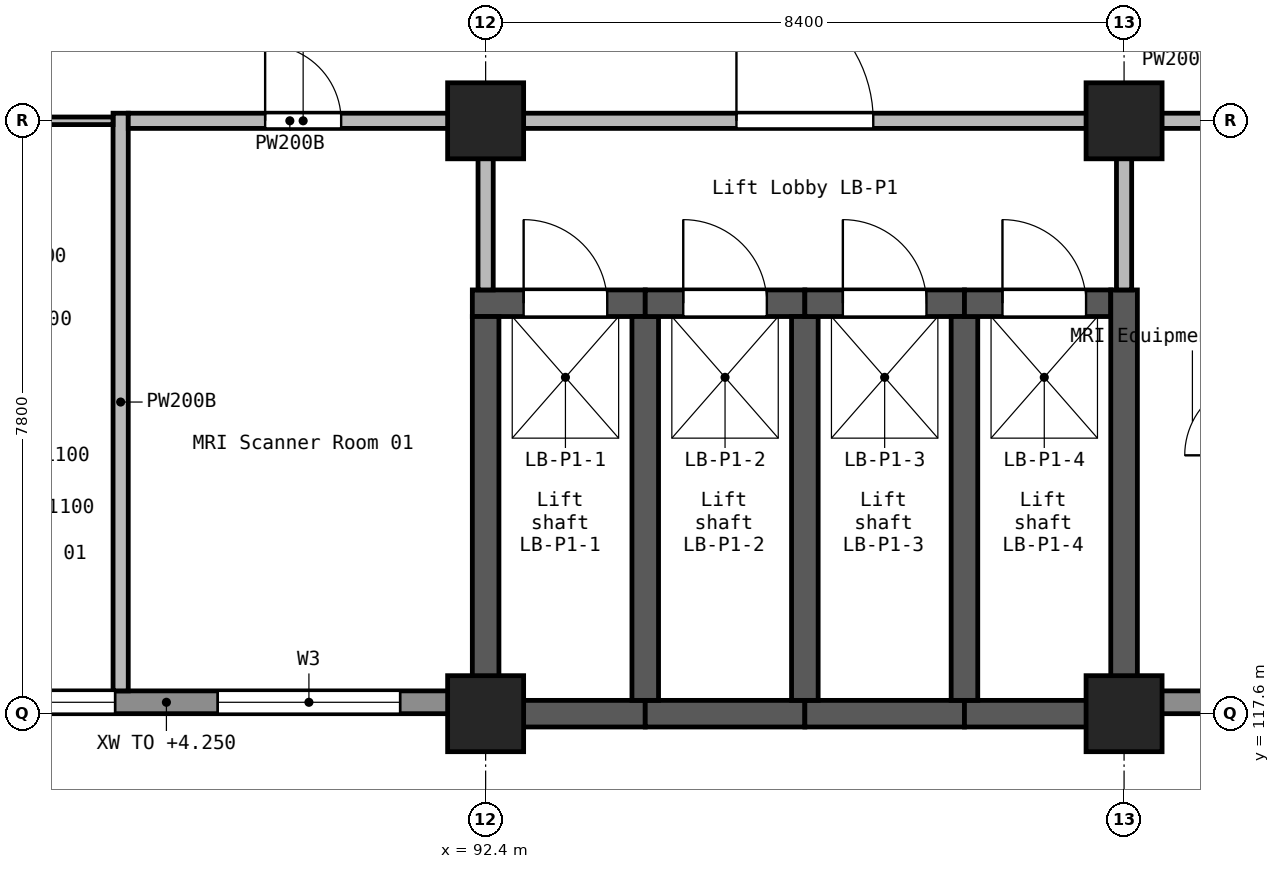
"""IFC4 building model, lengths in metres.
Left out: names, types, materials, properties, quantities, classifications, styles, units other than length and angle.
Written with IfcOpenShell. Run it as: python <this file> out.ifc"""

import sys

from ifc_helpers import new_model, si_unit, direction, frame, frame_2d, origin, origin_2d, place, context, subcontext, project, spatial, rectangle, extrude, element, fill, save


model = new_model("IFC4")
c1 = context("Model", 3, precision=1e-05, world=origin(), true_north=direction((0.0, 1.0)))
c2 = subcontext(c1, "Body", "Model", "MODEL_VIEW")
j1 = project(units=[si_unit("LENGTHUNIT", "METRE"), si_unit("PLANEANGLEUNIT", "RADIAN")], contexts=[c1])
p1 = place(None, origin())
s1 = spatial("IfcSite", under=j1, at=p1, CompositionType="ELEMENT")
p2 = place(p1, origin())
s2 = spatial("IfcBuilding", under=s1, at=p2, CompositionType="ELEMENT")
p3 = place(p2, origin())
s3 = spatial("IfcBuildingStorey", under=s2, at=p3, CompositionType="ELEMENT", Elevation=0.0)
for number, where, z_axis, x_axis in (
    (1, (92.4, 117.6, -0.3), (0.0, 0.0, 1.0), (1.0, 0.0, 0.0)),
    (2, (92.4, 125.4, -0.3), (0.0, 0.0, 1.0), (1.0, 0.0, 0.0)),
    (3, (100.8, 117.6, -0.3), (0.0, 0.0, 1.0), (1.0, 0.0, 0.0)),
    (4, (100.8, 125.4, -0.3), (0.0, 0.0, 1.0), (1.0, 0.0, 0.0)),
):
    element("IfcColumn", number, at=place(p3, frame(where, z_axis=z_axis, x_axis=x_axis)), inside=s3, PredefinedType="COLUMN", context=c2, shape_type="SweptSolid", body=[
        extrude(rectangle(XDim=1.0, YDim=1.0, at=origin_2d()), origin(), (0.0, 0.0, 1.0), 5.7),
    ])
p4 = place(p3, frame((92.225, 123.0, -0.3), z_axis=(0.0, 0.0, 1.0), x_axis=(1.0, 0.0, 0.0)))
e5 = element("IfcWall", 5, at=p4, inside=s3, PredefinedType="SHEAR", context=c2, shape_type="SweptSolid", body=[
    extrude(rectangle(XDim=2.275, YDim=0.35, at=frame_2d((1.137, 0.0))), origin(), (0.0, 0.0, 1.0), 5.7),
])
p5 = place(p4, frame((0.675, 0.0, 0.3)))
e6 = element("IfcOpeningElement", 6, at=p5, cuts=e5, PredefinedType="OPENING", context=c2, shape_type="SweptSolid", body=[
    extrude(rectangle(XDim=1.1, YDim=2.1, at=frame_2d((0.55, 1.05))), frame((0.0, 0.185, 0.0), z_axis=(0.0, -1.0, 0.0), x_axis=(1.0, 0.0, 0.0)), (0.0, 0.0, 1.0), 0.37),
])
p6 = place(p3, frame((92.4, 117.425, -0.3), z_axis=(0.0, 0.0, 1.0), x_axis=(0.0, 1.0, 0.0)))
e7 = element("IfcWall", 7, at=p6, inside=s3, PredefinedType="SHEAR", context=c2, shape_type="SweptSolid", body=[
    extrude(rectangle(XDim=5.4, YDim=0.35, at=frame_2d((2.7, 0.0))), origin(), (0.0, 0.0, 1.0), 5.7),
])
p7 = place(p3, frame((92.575, 117.6, -0.3), z_axis=(0.0, 0.0, 1.0), x_axis=(1.0, 0.0, 0.0)))
e8 = element("IfcWall", 8, at=p7, inside=s3, PredefinedType="SHEAR", context=c2, shape_type="SweptSolid", body=[
    extrude(rectangle(XDim=1.925, YDim=0.35, at=frame_2d((0.962, 0.0))), origin(), (0.0, 0.0, 1.0), 5.7),
])
p8 = place(p3, frame((94.5, 117.6, -0.3), z_axis=(0.0, 0.0, 1.0), x_axis=(1.0, 0.0, 0.0)))
e9 = element("IfcWall", 9, at=p8, inside=s3, PredefinedType="SHEAR", context=c2, shape_type="SweptSolid", body=[
    extrude(rectangle(XDim=2.1, YDim=0.35, at=frame_2d((1.05, 0.0))), origin(), (0.0, 0.0, 1.0), 5.7),
])
p9 = place(p3, frame((94.5, 117.775, -0.3), z_axis=(0.0, 0.0, 1.0), x_axis=(0.0, 1.0, 0.0)))
e10 = element("IfcWall", 10, at=p9, inside=s3, PredefinedType="SHEAR", context=c2, shape_type="SweptSolid", body=[
    extrude(rectangle(XDim=5.05, YDim=0.35, at=frame_2d((2.525, 0.0))), origin(), (0.0, 0.0, 1.0), 5.7),
])
p10 = place(p3, frame((94.5, 123.0, -0.3), z_axis=(0.0, 0.0, 1.0), x_axis=(1.0, 0.0, 0.0)))
e11 = element("IfcWall", 11, at=p10, inside=s3, PredefinedType="SHEAR", context=c2, shape_type="SweptSolid", body=[
    extrude(rectangle(XDim=2.1, YDim=0.35, at=frame_2d((1.05, 0.0))), origin(), (0.0, 0.0, 1.0), 5.7),
])
p11 = place(p10, frame((0.5, 0.0, 0.3)))
e12 = element("IfcOpeningElement", 12, at=p11, cuts=e11, PredefinedType="OPENING", context=c2, shape_type="SweptSolid", body=[
    extrude(rectangle(XDim=1.1, YDim=2.1, at=frame_2d((0.55, 1.05))), frame((0.0, 0.185, 0.0), z_axis=(0.0, -1.0, 0.0), x_axis=(1.0, 0.0, 0.0)), (0.0, 0.0, 1.0), 0.37),
])
p12 = place(p3, frame((96.6, 117.6, -0.3), z_axis=(0.0, 0.0, 1.0), x_axis=(1.0, 0.0, 0.0)))
e13 = element("IfcWall", 13, at=p12, inside=s3, PredefinedType="SHEAR", context=c2, shape_type="SweptSolid", body=[
    extrude(rectangle(XDim=2.1, YDim=0.35, at=frame_2d((1.05, 0.0))), origin(), (0.0, 0.0, 1.0), 5.7),
])
p13 = place(p3, frame((96.6, 117.775, -0.3), z_axis=(0.0, 0.0, 1.0), x_axis=(0.0, 1.0, 0.0)))
e14 = element("IfcWall", 14, at=p13, inside=s3, PredefinedType="SHEAR", context=c2, shape_type="SweptSolid", body=[
    extrude(rectangle(XDim=5.05, YDim=0.35, at=frame_2d((2.525, 0.0))), origin(), (0.0, 0.0, 1.0), 5.7),
])
p14 = place(p3, frame((96.6, 123.0, -0.3), z_axis=(0.0, 0.0, 1.0), x_axis=(1.0, 0.0, 0.0)))
e15 = element("IfcWall", 15, at=p14, inside=s3, PredefinedType="SHEAR", context=c2, shape_type="SweptSolid", body=[
    extrude(rectangle(XDim=2.1, YDim=0.35, at=frame_2d((1.05, 0.0))), origin(), (0.0, 0.0, 1.0), 5.7),
])
p15 = place(p14, frame((0.5, 0.0, 0.3)))
e16 = element("IfcOpeningElement", 16, at=p15, cuts=e15, PredefinedType="OPENING", context=c2, shape_type="SweptSolid", body=[
    extrude(rectangle(XDim=1.1, YDim=2.1, at=frame_2d((0.55, 1.05))), frame((0.0, 0.185, 0.0), z_axis=(0.0, -1.0, 0.0), x_axis=(1.0, 0.0, 0.0)), (0.0, 0.0, 1.0), 0.37),
])
p16 = place(p3, frame((98.7, 117.6, -0.3), z_axis=(0.0, 0.0, 1.0), x_axis=(1.0, 0.0, 0.0)))
e17 = element("IfcWall", 17, at=p16, inside=s3, PredefinedType="SHEAR", context=c2, shape_type="SweptSolid", body=[
    extrude(rectangle(XDim=1.925, YDim=0.35, at=frame_2d((0.962, 0.0))), origin(), (0.0, 0.0, 1.0), 5.7),
])
p17 = place(p3, frame((98.7, 117.775, -0.3), z_axis=(0.0, 0.0, 1.0), x_axis=(0.0, 1.0, 0.0)))
e18 = element("IfcWall", 18, at=p17, inside=s3, PredefinedType="SHEAR", context=c2, shape_type="SweptSolid", body=[
    extrude(rectangle(XDim=5.05, YDim=0.35, at=frame_2d((2.525, 0.0))), origin(), (0.0, 0.0, 1.0), 5.7),
])
p18 = place(p3, frame((98.7, 123.0, -0.3), z_axis=(0.0, 0.0, 1.0), x_axis=(1.0, 0.0, 0.0)))
e19 = element("IfcWall", 19, at=p18, inside=s3, PredefinedType="SHEAR", context=c2, shape_type="SweptSolid", body=[
    extrude(rectangle(XDim=1.925, YDim=0.35, at=frame_2d((0.962, 0.0))), origin(), (0.0, 0.0, 1.0), 5.7),
])
p19 = place(p18, frame((0.5, 0.0, 0.3)))
e20 = element("IfcOpeningElement", 20, at=p19, cuts=e19, PredefinedType="OPENING", context=c2, shape_type="SweptSolid", body=[
    extrude(rectangle(XDim=1.1, YDim=2.1, at=frame_2d((0.55, 1.05))), frame((0.0, 0.185, 0.0), z_axis=(0.0, -1.0, 0.0), x_axis=(1.0, 0.0, 0.0)), (0.0, 0.0, 1.0), 0.37),
])
p20 = place(p3, frame((100.8, 117.425, -0.3), z_axis=(0.0, 0.0, 1.0), x_axis=(0.0, 1.0, 0.0)))
e21 = element("IfcWall", 21, at=p20, inside=s3, PredefinedType="SHEAR", context=c2, shape_type="SweptSolid", body=[
    extrude(rectangle(XDim=5.75, YDim=0.35, at=frame_2d((2.875, 0.0))), origin(), (0.0, 0.0, 1.0), 5.7),
])
p21 = place(p3, frame((84.45, 117.75, 0.0), z_axis=(0.0, 0.0, 1.0), x_axis=(1.0, 0.0, 0.0)))
e22 = element("IfcWall", 22, at=p21, inside=s3, PredefinedType="STANDARD", context=c2, shape_type="SweptSolid", body=[
    extrude(rectangle(XDim=7.5, YDim=0.3, at=frame_2d((3.75, 0.0))), origin(), (0.0, 0.0, 1.0), 4.25),
])
p22 = place(p21, frame((0.675, 0.0, 0.9)))
e23 = element("IfcOpeningElement", 23, at=p22, cuts=e22, PredefinedType="OPENING", context=c2, shape_type="SweptSolid", body=[
    extrude(rectangle(XDim=2.4, YDim=1.5, at=frame_2d((1.2, 0.75))), frame((0.0, 0.16, 0.0), z_axis=(0.0, -1.0, 0.0), x_axis=(1.0, 0.0, 0.0)), (0.0, 0.0, 1.0), 0.32),
])
p23 = place(p21, frame((4.425, 0.0, 0.9)))
e24 = element("IfcOpeningElement", 24, at=p23, cuts=e22, PredefinedType="OPENING", context=c2, shape_type="SweptSolid", body=[
    extrude(rectangle(XDim=2.4, YDim=1.5, at=frame_2d((1.2, 0.75))), frame((0.0, 0.16, 0.0), z_axis=(0.0, -1.0, 0.0), x_axis=(1.0, 0.0, 0.0)), (0.0, 0.0, 1.0), 0.32),
])
p24 = place(p3, frame((101.25, 117.75, 0.0), z_axis=(0.0, 0.0, 1.0), x_axis=(1.0, 0.0, 0.0)))
e25 = element("IfcWall", 25, at=p24, inside=s3, PredefinedType="STANDARD", context=c2, shape_type="SweptSolid", body=[
    extrude(rectangle(XDim=7.5, YDim=0.3, at=frame_2d((3.75, 0.0))), origin(), (0.0, 0.0, 1.0), 4.25),
])
p25 = place(p24, frame((1.525, 0.0, 0.9)))
e26 = element("IfcOpeningElement", 26, at=p25, cuts=e25, PredefinedType="OPENING", context=c2, shape_type="SweptSolid", body=[
    extrude(rectangle(XDim=2.4, YDim=1.5, at=frame_2d((1.2, 0.75))), frame((0.0, 0.16, 0.0), z_axis=(0.0, -1.0, 0.0), x_axis=(1.0, 0.0, 0.0)), (0.0, 0.0, 1.0), 0.32),
])
p26 = place(p24, frame((4.425, 0.0, 0.9)))
e27 = element("IfcOpeningElement", 27, at=p26, cuts=e25, PredefinedType="OPENING", context=c2, shape_type="SweptSolid", body=[
    extrude(rectangle(XDim=2.4, YDim=1.5, at=frame_2d((1.2, 0.75))), frame((0.0, 0.16, 0.0), z_axis=(0.0, -1.0, 0.0), x_axis=(1.0, 0.0, 0.0)), (0.0, 0.0, 1.0), 0.32),
])
p27 = place(p3, frame((92.85, 125.4, 0.0), z_axis=(0.0, 0.0, 1.0), x_axis=(1.0, 0.0, 0.0)))
e28 = element("IfcWall", 28, at=p27, inside=s3, PredefinedType="SOLIDWALL", context=c2, shape_type="SweptSolid", body=[
    extrude(rectangle(XDim=7.5, YDim=0.2, at=frame_2d((3.75, 0.0))), origin(), (0.0, 0.0, 1.0), 5.05),
])
p28 = place(p27, frame((2.85, 0.0, 0.0)))
e29 = element("IfcOpeningElement", 29, at=p28, cuts=e28, PredefinedType="OPENING", context=c2, shape_type="SweptSolid", body=[
    extrude(rectangle(XDim=1.8, YDim=2.1, at=frame_2d((0.9, 1.05))), frame((0.0, 0.11, 0.0), z_axis=(0.0, -1.0, 0.0), x_axis=(1.0, 0.0, 0.0)), (0.0, 0.0, 1.0), 0.22),
])
for number, where, z_axis, x_axis in (
    (30, (92.4, 123.175, 0.0), (0.0, 0.0, 1.0), (0.0, 1.0, 0.0)),
    (31, (100.8, 123.175, 0.0), (0.0, 0.0, 1.0), (0.0, 1.0, 0.0)),
):
    element("IfcWall", number, at=place(p3, frame(where, z_axis=z_axis, x_axis=x_axis)), inside=s3, PredefinedType="SOLIDWALL", context=c2, shape_type="SweptSolid", body=[
        extrude(rectangle(XDim=1.775, YDim=0.2, at=frame_2d((0.887, 0.0))), origin(), (0.0, 0.0, 1.0), 5.05),
    ])
p29 = place(p3, frame((101.25, 125.4, 0.0), z_axis=(0.0, 0.0, 1.0), x_axis=(1.0, 0.0, 0.0)))
e32 = element("IfcWall", 32, at=p29, inside=s3, PredefinedType="SOLIDWALL", context=c2, shape_type="SweptSolid", body=[
    extrude(rectangle(XDim=1.248, YDim=0.2, at=frame_2d((0.624, 0.0))), origin(), (0.0, 0.0, 1.0), 5.05),
])
p30 = place(p3, frame((87.598, 117.9, 0.0), z_axis=(0.0, 0.0, 1.0), x_axis=(0.0, 1.0, 0.0)))
e33 = element("IfcWall", 33, at=p30, inside=s3, PredefinedType="SOLIDWALL", context=c2, shape_type="SweptSolid", body=[
    extrude(rectangle(XDim=7.6, YDim=0.2, at=frame_2d((3.8, 0.0))), origin(), (0.0, 0.0, 1.0), 5.05),
])
p31 = place(p3, frame((87.698, 125.4, 0.0), z_axis=(0.0, 0.0, 1.0), x_axis=(1.0, 0.0, 0.0)))
e34 = element("IfcWall", 34, at=p31, inside=s3, PredefinedType="SOLIDWALL", context=c2, shape_type="SweptSolid", body=[
    extrude(rectangle(XDim=4.252, YDim=0.2, at=frame_2d((2.126, 0.0))), origin(), (0.0, 0.0, 1.0), 5.05),
])
p32 = place(p31, frame((1.801, 0.0, 0.0)))
e35 = element("IfcOpeningElement", 35, at=p32, cuts=e34, PredefinedType="OPENING", context=c2, shape_type="SweptSolid", body=[
    extrude(rectangle(XDim=1.0, YDim=2.1, at=frame_2d((0.5, 1.05))), frame((0.0, 0.11, 0.0), z_axis=(0.0, -1.0, 0.0), x_axis=(1.0, 0.0, 0.0)), (0.0, 0.0, 1.0), 0.22),
])
p33 = place(p3, frame((84.45, 125.4, 0.0), z_axis=(0.0, 0.0, 1.0), x_axis=(1.0, 0.0, 0.0)))
e36 = element("IfcWall", 36, at=p33, inside=s3, PredefinedType="PARTITIONING", context=c2, shape_type="SweptSolid", body=[
    extrude(rectangle(XDim=3.048, YDim=0.1, at=frame_2d((1.524, 0.0))), origin(), (0.0, 0.0, 1.0), 5.05),
])
p34 = place(p33, frame((0.899, 0.0, 0.0)))
e37 = element("IfcOpeningElement", 37, at=p34, cuts=e36, PredefinedType="OPENING", context=c2, shape_type="SweptSolid", body=[
    extrude(rectangle(XDim=0.9, YDim=2.1, at=frame_2d((0.45, 1.05))), frame((0.0, 0.06, 0.0), z_axis=(0.0, -1.0, 0.0), x_axis=(1.0, 0.0, 0.0)), (0.0, 0.0, 1.0), 0.12),
])
p35 = place(p22, origin())
e38 = element("IfcWindow", 38, at=p35, inside=s3, PartitioningType="SINGLE_PANEL", PredefinedType="WINDOW", context=c2, shape_type="SweptSolid", body=[
    extrude(rectangle(XDim=2.4, YDim=1.5, at=frame_2d((1.2, 0.75))), frame((0.0, 0.03, 0.0), z_axis=(0.0, -1.0, 0.0), x_axis=(1.0, 0.0, 0.0)), (0.0, 0.0, 1.0), 0.06),
])
fill(e23, e38)
p36 = place(p23, origin())
e39 = element("IfcWindow", 39, at=p36, inside=s3, PartitioningType="SINGLE_PANEL", PredefinedType="WINDOW", context=c2, shape_type="SweptSolid", body=[
    extrude(rectangle(XDim=2.4, YDim=1.5, at=frame_2d((1.2, 0.75))), frame((0.0, 0.03, 0.0), z_axis=(0.0, -1.0, 0.0), x_axis=(1.0, 0.0, 0.0)), (0.0, 0.0, 1.0), 0.06),
])
fill(e24, e39)
p37 = place(p5, origin())
e40 = element("IfcDoor", 40, at=p37, inside=s3, OperationType="DOUBLE_DOOR_SLIDING", PredefinedType="DOOR", context=c2, shape_type="SweptSolid", body=[
    extrude(rectangle(XDim=1.1, YDim=2.1, at=frame_2d((0.55, 1.05))), frame((0.0, 0.025, 0.0), z_axis=(0.0, -1.0, 0.0), x_axis=(1.0, 0.0, 0.0)), (0.0, 0.0, 1.0), 0.05),
])
fill(e6, e40)
p38 = place(p11, origin())
e41 = element("IfcDoor", 41, at=p38, inside=s3, OperationType="DOUBLE_DOOR_SLIDING", PredefinedType="DOOR", context=c2, shape_type="SweptSolid", body=[
    extrude(rectangle(XDim=1.1, YDim=2.1, at=frame_2d((0.55, 1.05))), frame((0.0, 0.025, 0.0), z_axis=(0.0, -1.0, 0.0), x_axis=(1.0, 0.0, 0.0)), (0.0, 0.0, 1.0), 0.05),
])
fill(e12, e41)
p39 = place(p15, origin())
e42 = element("IfcDoor", 42, at=p39, inside=s3, OperationType="DOUBLE_DOOR_SLIDING", PredefinedType="DOOR", context=c2, shape_type="SweptSolid", body=[
    extrude(rectangle(XDim=1.1, YDim=2.1, at=frame_2d((0.55, 1.05))), frame((0.0, 0.025, 0.0), z_axis=(0.0, -1.0, 0.0), x_axis=(1.0, 0.0, 0.0)), (0.0, 0.0, 1.0), 0.05),
])
fill(e16, e42)
p40 = place(p19, origin())
e43 = element("IfcDoor", 43, at=p40, inside=s3, OperationType="DOUBLE_DOOR_SLIDING", PredefinedType="DOOR", context=c2, shape_type="SweptSolid", body=[
    extrude(rectangle(XDim=1.1, YDim=2.1, at=frame_2d((0.55, 1.05))), frame((0.0, 0.025, 0.0), z_axis=(0.0, -1.0, 0.0), x_axis=(1.0, 0.0, 0.0)), (0.0, 0.0, 1.0), 0.05),
])
fill(e20, e43)
p41 = place(p28, frame((1.8, 0.0, 0.0), z_axis=(0.0, 0.0, 1.0), x_axis=(-1.0, 0.0, 0.0)))
e44 = element("IfcDoor", 44, at=p41, inside=s3, OperationType="DOUBLE_DOOR_SINGLE_SWING", PredefinedType="DOOR", context=c2, shape_type="SweptSolid", body=[
    extrude(rectangle(XDim=1.8, YDim=2.1, at=frame_2d((0.9, 1.05))), frame((0.0, 0.025, 0.0), z_axis=(0.0, -1.0, 0.0), x_axis=(1.0, 0.0, 0.0)), (0.0, 0.0, 1.0), 0.05),
])
fill(e29, e44)
p42 = place(p32, frame((1.0, 0.0, 0.0), z_axis=(0.0, 0.0, 1.0), x_axis=(-1.0, 0.0, 0.0)))
e45 = element("IfcDoor", 45, at=p42, inside=s3, OperationType="SINGLE_SWING_LEFT", PredefinedType="DOOR", context=c2, shape_type="SweptSolid", body=[
    extrude(rectangle(XDim=1.0, YDim=2.1, at=frame_2d((0.5, 1.05))), frame((0.0, 0.025, 0.0), z_axis=(0.0, -1.0, 0.0), x_axis=(1.0, 0.0, 0.0)), (0.0, 0.0, 1.0), 0.05),
])
fill(e35, e45)
save(model, sys.argv[1])
